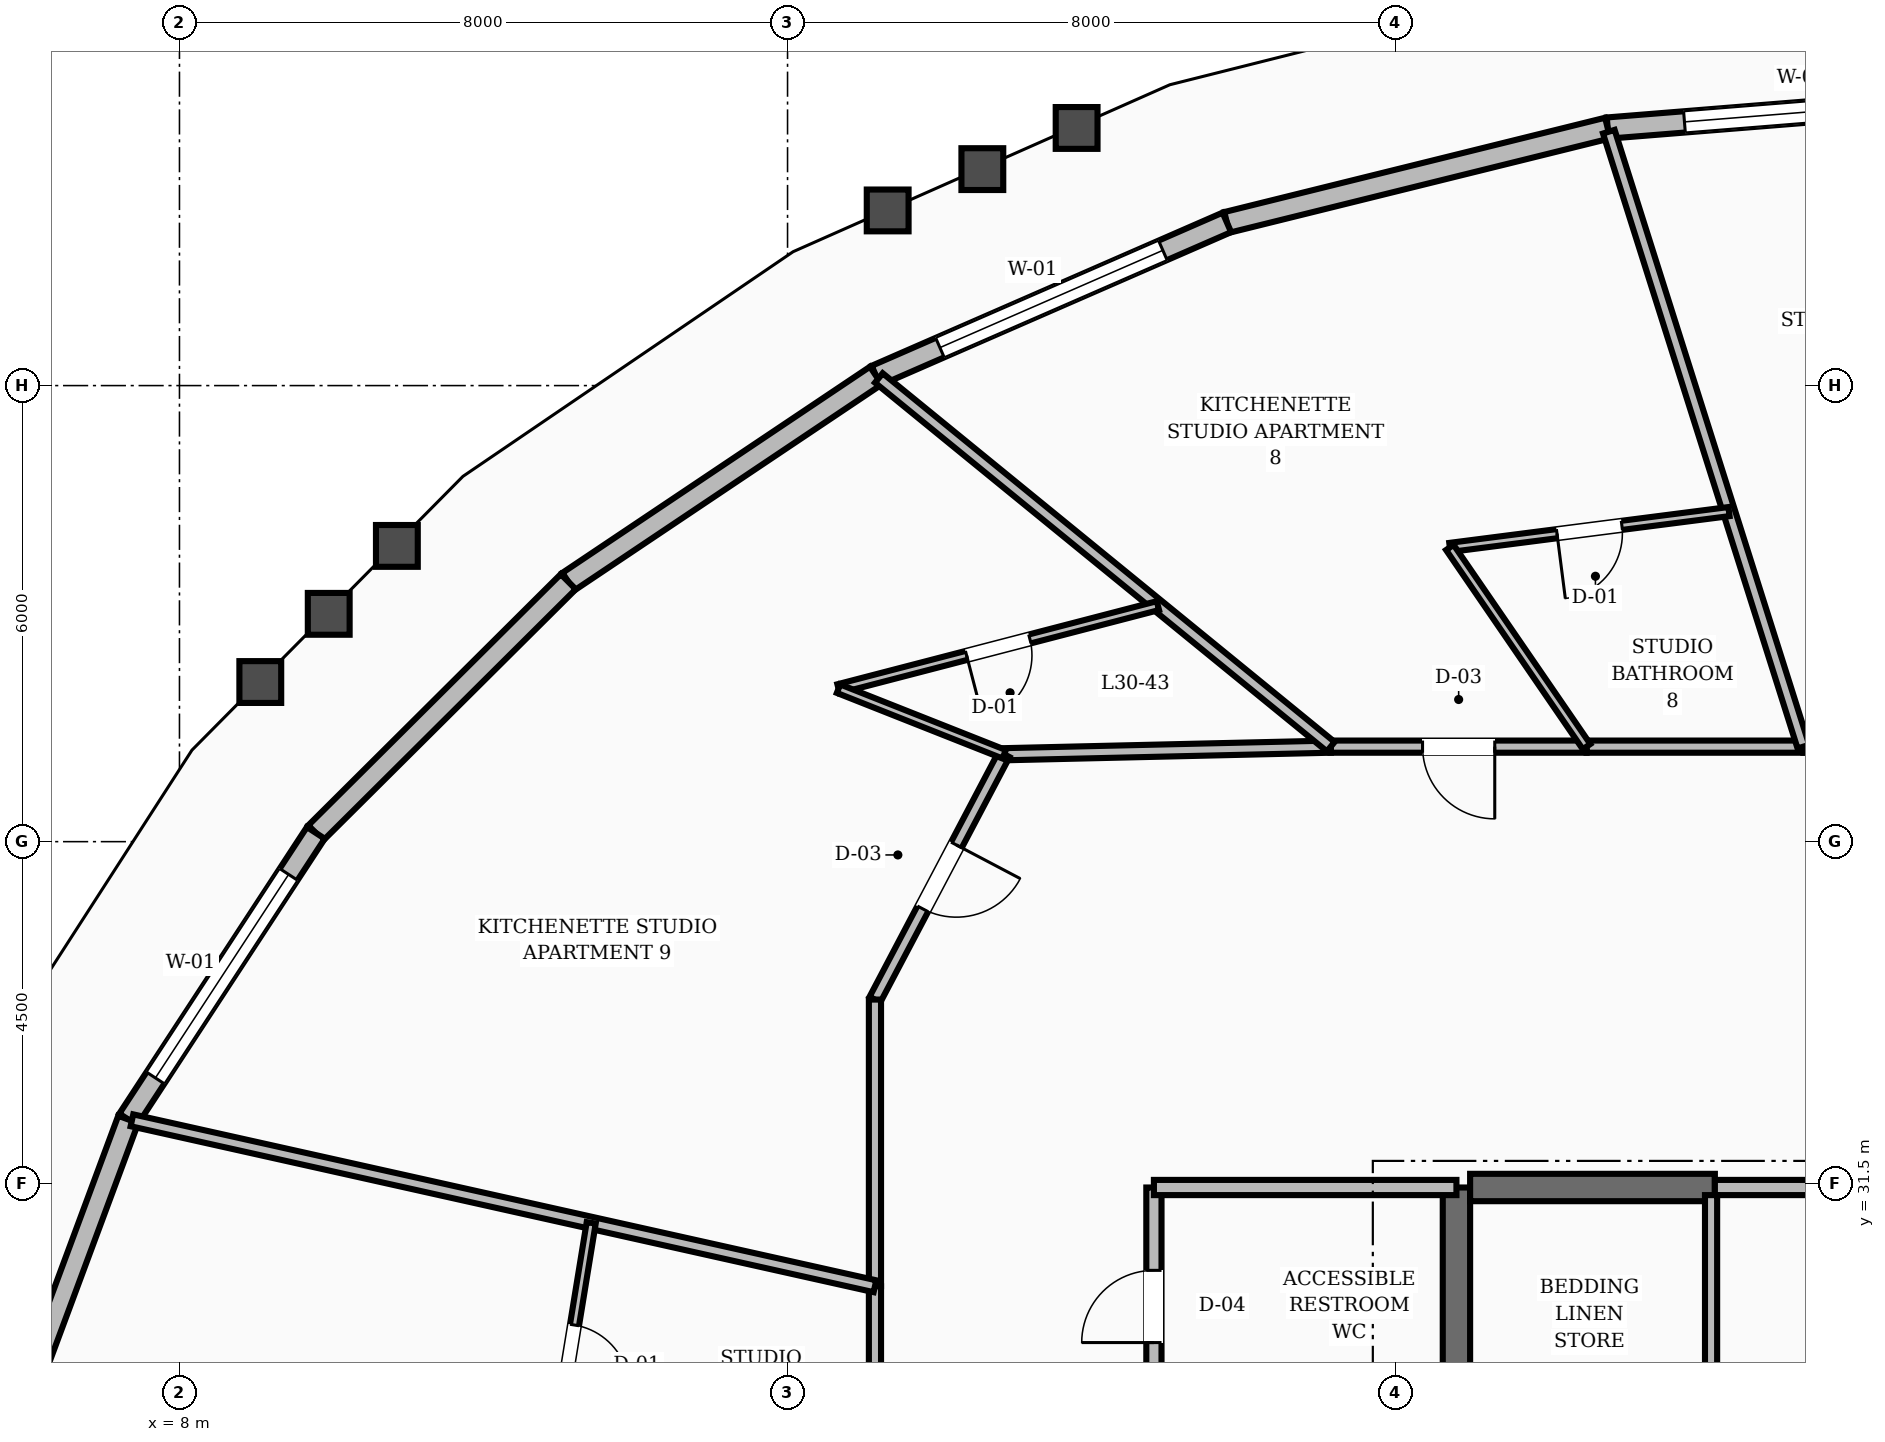
"""IFC4 building model, lengths in metres.
Left out: names, types, materials, properties, quantities, classifications, styles, units other than length and angle.
Written with IfcOpenShell. Run it as: python <this file> out.ifc"""

import sys

from ifc_helpers import new_model, si_unit, direction, frame, frame_2d, origin, place, context, subcontext, project, spatial, rectangle, extrude, element, fill, save


model = new_model("IFC4")
c1 = context("Model", 3, precision=1e-05, world=origin(), true_north=direction((0.0, 1.0)))
c2 = subcontext(c1, "Body", "Model", "MODEL_VIEW")
j1 = project(units=[si_unit("LENGTHUNIT", "METRE"), si_unit("PLANEANGLEUNIT", "RADIAN")], contexts=[c1])
p1 = place(None, origin())
s1 = spatial("IfcSite", under=j1, at=p1, CompositionType="ELEMENT")
p2 = place(p1, origin())
s2 = spatial("IfcBuilding", under=s1, at=p2, CompositionType="ELEMENT")
p3 = place(p2, frame((0.0, 0.0, 120.8)))
s3 = spatial("IfcBuildingStorey", under=s2, at=p3, CompositionType="ELEMENT", Elevation=120.8)
p4 = place(p3, frame((24.8, 25.15, 0.0), z_axis=(0.0, 0.0, 1.0), x_axis=(0.0, 1.0, 0.0)))
e1 = element("IfcWall", 1, at=p4, inside=s3, PredefinedType="SHEAR", context=c2, shape_type="SweptSolid", body=[
    extrude(rectangle(XDim=6.3, YDim=0.36, at=frame_2d((3.15, 0.0))), origin(), (0.0, 0.0, 1.0), 3.6),
])
p5 = place(p3, frame((24.98, 31.45, 0.0), z_axis=(0.0, 0.0, 1.0), x_axis=(1.0, 0.0, 0.0)))
e2 = element("IfcWall", 2, at=p5, inside=s3, PredefinedType="SHEAR", context=c2, shape_type="SweptSolid", body=[
    extrude(rectangle(XDim=3.22, YDim=0.36, at=frame_2d((1.61, 0.0))), origin(), (0.0, 0.0, 1.0), 3.6),
])
p6 = place(p3, frame((32.0, 45.807, 0.0), z_axis=(0.0, 0.0, 1.0), x_axis=(-0.996782820501, -0.080149914249, 0.0)))
e3 = element("IfcWall", 3, at=p6, inside=s3, PredefinedType="STANDARD", context=c2, shape_type="SweptSolid", body=[
    extrude(rectangle(XDim=5.227, YDim=0.28, at=frame_2d((2.614, 0.0))), origin(), (0.0, 0.0, 1.0), 2.82),
])
p7 = place(p6, frame((1.014, 0.0, 0.8)))
e4 = element("IfcOpeningElement", 4, at=p7, cuts=e3, PredefinedType="OPENING", context=c2, shape_type="SweptSolid", body=[
    extrude(rectangle(XDim=3.2, YDim=1.65, at=frame_2d((1.6, 0.825))), frame((0.0, 0.15, 0.0), z_axis=(0.0, -1.0, 0.0), x_axis=(1.0, 0.0, 0.0)), (0.0, 0.0, 1.0), 0.3),
])
p8 = place(p3, frame((26.79, 45.388, 0.0), z_axis=(0.0, 0.0, 1.0), x_axis=(-0.970666096737, -0.240431546694, 0.0)))
e5 = element("IfcWall", 5, at=p8, inside=s3, PredefinedType="STANDARD", context=c2, shape_type="SweptSolid", body=[
    extrude(rectangle(XDim=5.161, YDim=0.28, at=frame_2d((2.581, 0.0))), origin(), (0.0, 0.0, 1.0), 2.82),
])
p9 = place(p3, frame((21.78, 44.147, 0.0), z_axis=(0.0, 0.0, 1.0), x_axis=(-0.916520644769, -0.399987384441, 0.0)))
e6 = element("IfcWall", 6, at=p9, inside=s3, PredefinedType="STANDARD", context=c2, shape_type="SweptSolid", body=[
    extrude(rectangle(XDim=5.038, YDim=0.28, at=frame_2d((2.519, 0.0))), origin(), (0.0, 0.0, 1.0), 2.82),
])
p10 = place(p9, frame((0.919, 0.0, 0.8)))
e7 = element("IfcOpeningElement", 7, at=p10, cuts=e6, PredefinedType="OPENING", context=c2, shape_type="SweptSolid", body=[
    extrude(rectangle(XDim=3.2, YDim=1.65, at=frame_2d((1.6, 0.825))), frame((0.0, 0.15, 0.0), z_axis=(0.0, -1.0, 0.0), x_axis=(1.0, 0.0, 0.0)), (0.0, 0.0, 1.0), 0.3),
])
p11 = place(p3, frame((17.162, 42.132, 0.0), z_axis=(0.0, 0.0, 1.0), x_axis=(-0.830737301714, -0.556664652678, 0.0)))
e8 = element("IfcWall", 8, at=p11, inside=s3, PredefinedType="STANDARD", context=c2, shape_type="SweptSolid", body=[
    extrude(rectangle(XDim=4.872, YDim=0.28, at=frame_2d((2.436, 0.0))), origin(), (0.0, 0.0, 1.0), 2.82),
])
p12 = place(p3, frame((13.115, 39.42, 0.0), z_axis=(0.0, 0.0, 1.0), x_axis=(-0.708876231206, -0.705332892208, 0.0)))
e9 = element("IfcWall", 9, at=p12, inside=s3, PredefinedType="STANDARD", context=c2, shape_type="SweptSolid", body=[
    extrude(rectangle(XDim=4.685, YDim=0.28, at=frame_2d((2.343, 0.0))), origin(), (0.0, 0.0, 1.0), 2.82),
])
p13 = place(p3, frame((9.794, 36.115, 0.0), z_axis=(0.0, 0.0, 1.0), x_axis=(-0.547716413999, -0.836664048371, 0.0)))
e10 = element("IfcWall", 10, at=p13, inside=s3, PredefinedType="STANDARD", context=c2, shape_type="SweptSolid", body=[
    extrude(rectangle(XDim=4.506, YDim=0.28, at=frame_2d((2.253, 0.0))), origin(), (0.0, 0.0, 1.0), 2.82),
])
p14 = place(p13, frame((0.653, 0.0, 0.8)))
e11 = element("IfcOpeningElement", 11, at=p14, cuts=e10, PredefinedType="OPENING", context=c2, shape_type="SweptSolid", body=[
    extrude(rectangle(XDim=3.2, YDim=1.65, at=frame_2d((1.6, 0.825))), frame((0.0, 0.15, 0.0), z_axis=(0.0, -1.0, 0.0), x_axis=(1.0, 0.0, 0.0)), (0.0, 0.0, 1.0), 0.3),
])
p15 = place(p3, frame((7.326, 32.345, 0.0), z_axis=(0.0, 0.0, 1.0), x_axis=(-0.348252546088, -0.937400748956, 0.0)))
e12 = element("IfcWall", 12, at=p15, inside=s3, PredefinedType="STANDARD", context=c2, shape_type="SweptSolid", body=[
    extrude(rectangle(XDim=4.364, YDim=0.28, at=frame_2d((2.182, 0.0))), origin(), (0.0, 0.0, 1.0), 2.82),
])
p16 = place(p3, frame((20.82, 28.32, 0.0), z_axis=(0.0, 0.0, 1.0), x_axis=(0.0, 1.0, 0.0)))
e13 = element("IfcWall", 13, at=p16, inside=s3, PredefinedType="SOLIDWALL", context=c2, shape_type="SweptSolid", body=[
    extrude(rectangle(XDim=3.13, YDim=0.2, at=frame_2d((1.565, 0.0))), origin(), (0.0, 0.0, 1.0), 2.8),
])
p17 = place(p16, frame((1.09, 0.0, 0.0)))
e14 = element("IfcOpeningElement", 14, at=p17, cuts=e13, PredefinedType="OPENING", context=c2, shape_type="SweptSolid", body=[
    extrude(rectangle(XDim=0.95, YDim=2.1, at=frame_2d((0.475, 1.05))), frame((0.0, 0.11, 0.0), z_axis=(0.0, -1.0, 0.0), x_axis=(1.0, 0.0, 0.0)), (0.0, 0.0, 1.0), 0.22),
])
p18 = place(p3, frame((20.82, 31.45, 0.0), z_axis=(0.0, 0.0, 1.0), x_axis=(1.0, 0.0, 0.0)))
e15 = element("IfcWall", 15, at=p18, inside=s3, PredefinedType="SOLIDWALL", context=c2, shape_type="SweptSolid", body=[
    extrude(rectangle(XDim=3.98, YDim=0.2, at=frame_2d((1.99, 0.0))), origin(), (0.0, 0.0, 1.0), 2.8),
])
p19 = place(p3, frame((28.2, 31.45, 0.0), z_axis=(0.0, 0.0, 1.0), x_axis=(1.0, 0.0, 0.0)))
e16 = element("IfcWall", 16, at=p19, inside=s3, PredefinedType="SOLIDWALL", context=c2, shape_type="SweptSolid", body=[
    extrude(rectangle(XDim=7.6, YDim=0.2, at=frame_2d((3.8, 0.0))), origin(), (0.0, 0.0, 1.0), 2.8),
])
p20 = place(p3, frame((28.15, 25.25, 0.0), z_axis=(0.0, 0.0, 1.0), x_axis=(0.0, 1.0, 0.0)))
e17 = element("IfcWall", 17, at=p20, inside=s3, PredefinedType="SOLIDWALL", context=c2, shape_type="SweptSolid", body=[
    extrude(rectangle(XDim=6.1, YDim=0.16, at=frame_2d((3.05, 0.0))), origin(), (0.0, 0.0, 1.0), 2.8),
])
p21 = place(p3, frame((32.0, 37.25, 0.0), z_axis=(0.0, 0.0, 1.0), x_axis=(-1.0, 0.0, 0.0)))
e18 = element("IfcWall", 18, at=p21, inside=s3, PredefinedType="SOLIDWALL", context=c2, shape_type="SweptSolid", body=[
    extrude(rectangle(XDim=2.635, YDim=0.16, at=frame_2d((1.318, 0.0))), origin(), (0.0, 0.0, 1.0), 2.8),
])
p22 = place(p21, frame((0.843, 0.0, 0.0)))
e19 = element("IfcOpeningElement", 19, at=p22, cuts=e18, PredefinedType="OPENING", context=c2, shape_type="SweptSolid", body=[
    extrude(rectangle(XDim=0.95, YDim=2.1, at=frame_2d((0.475, 1.05))), frame((0.0, 0.09, 0.0), z_axis=(0.0, -1.0, 0.0), x_axis=(1.0, 0.0, 0.0)), (0.0, 0.0, 1.0), 0.18),
])
p23 = place(p3, frame((29.365, 37.25, 0.0), z_axis=(0.0, 0.0, 1.0), x_axis=(-1.0, 0.0, 0.0)))
e20 = element("IfcWall", 20, at=p23, inside=s3, PredefinedType="SOLIDWALL", context=c2, shape_type="SweptSolid", body=[
    extrude(rectangle(XDim=2.853, YDim=0.16, at=frame_2d((1.426, 0.0))), origin(), (0.0, 0.0, 1.0), 2.8),
])
p24 = place(p3, frame((26.512, 37.25, 0.0), z_axis=(0.0, 0.0, 1.0), x_axis=(-1.0, 0.0, 0.0)))
e21 = element("IfcWall", 21, at=p24, inside=s3, PredefinedType="SOLIDWALL", context=c2, shape_type="SweptSolid", body=[
    extrude(rectangle(XDim=3.365, YDim=0.16, at=frame_2d((1.683, 0.0))), origin(), (0.0, 0.0, 1.0), 2.8),
])
p25 = place(p24, frame((1.208, 0.0, 0.0)))
e22 = element("IfcOpeningElement", 22, at=p25, cuts=e21, PredefinedType="OPENING", context=c2, shape_type="SweptSolid", body=[
    extrude(rectangle(XDim=0.95, YDim=2.1, at=frame_2d((0.475, 1.05))), frame((0.0, 0.09, 0.0), z_axis=(0.0, -1.0, 0.0), x_axis=(1.0, 0.0, 0.0)), (0.0, 0.0, 1.0), 0.18),
])
p26 = place(p3, frame((23.146, 37.25, 0.0), z_axis=(0.0, 0.0, 1.0), x_axis=(-0.999728709658, -0.023291781507, 0.0)))
e23 = element("IfcWall", 23, at=p26, inside=s3, PredefinedType="SOLIDWALL", context=c2, shape_type="SweptSolid", body=[
    extrude(rectangle(XDim=4.298, YDim=0.16, at=frame_2d((2.149, 0.0))), origin(), (0.0, 0.0, 1.0), 2.8),
])
p27 = place(p3, frame((18.85, 37.15, 0.0), z_axis=(0.0, 0.0, 1.0), x_axis=(-0.466093963429, -0.884735224378, 0.0)))
e24 = element("IfcWall", 24, at=p27, inside=s3, PredefinedType="SOLIDWALL", context=c2, shape_type="SweptSolid", body=[
    extrude(rectangle(XDim=3.648, YDim=0.16, at=frame_2d((1.824, 0.0))), origin(), (0.0, 0.0, 1.0), 2.8),
])
p28 = place(p27, frame((1.349, 0.0, 0.0)))
e25 = element("IfcOpeningElement", 25, at=p28, cuts=e24, PredefinedType="OPENING", context=c2, shape_type="SweptSolid", body=[
    extrude(rectangle(XDim=0.95, YDim=2.1, at=frame_2d((0.475, 1.05))), frame((0.0, 0.09, 0.0), z_axis=(0.0, -1.0, 0.0), x_axis=(1.0, 0.0, 0.0)), (0.0, 0.0, 1.0), 0.18),
])
p29 = place(p3, frame((17.15, 33.923, 0.0), z_axis=(0.0, 0.0, 1.0), x_axis=(0.0, -1.0, 0.0)))
e26 = element("IfcWall", 26, at=p29, inside=s3, PredefinedType="SOLIDWALL", context=c2, shape_type="SweptSolid", body=[
    extrude(rectangle(XDim=3.771, YDim=0.16, at=frame_2d((1.886, 0.0))), origin(), (0.0, 0.0, 1.0), 2.8),
])
p30 = place(p3, frame((17.15, 30.151, 0.0), z_axis=(0.0, 0.0, 1.0), x_axis=(0.0, -1.0, 0.0)))
e27 = element("IfcWall", 27, at=p30, inside=s3, PredefinedType="SOLIDWALL", context=c2, shape_type="SweptSolid", body=[
    extrude(rectangle(XDim=3.197, YDim=0.16, at=frame_2d((1.599, 0.0))), origin(), (0.0, 0.0, 1.0), 2.8),
])
p31 = place(p3, frame((29.365, 37.25, 0.0), z_axis=(0.0, 0.0, 1.0), x_axis=(-0.30167247597, 0.953411620048, 0.0)))
e28 = element("IfcWall", 28, at=p31, inside=s3, PredefinedType="SOLIDWALL", context=c2, shape_type="SweptSolid", body=[
    extrude(rectangle(XDim=8.485, YDim=0.16, at=frame_2d((4.243, 0.0))), origin(), (0.0, 0.0, 1.0), 2.8),
])
p32 = place(p3, frame((28.386, 40.342, 0.0), z_axis=(0.0, 0.0, 1.0), x_axis=(-0.991861607412, -0.127320665021, 0.0)))
e29 = element("IfcWall", 29, at=p32, inside=s3, PredefinedType="PARTITIONING", context=c2, shape_type="SweptSolid", body=[
    extrude(rectangle(XDim=3.703, YDim=0.12, at=frame_2d((1.851, 0.0))), origin(), (0.0, 0.0, 1.0), 2.8),
])
p33 = place(p32, frame((1.421, 0.0, 0.0)))
e30 = element("IfcOpeningElement", 30, at=p33, cuts=e29, PredefinedType="OPENING", context=c2, shape_type="SweptSolid", body=[
    extrude(rectangle(XDim=0.86, YDim=2.1, at=frame_2d((0.43, 1.05))), frame((0.0, 0.07, 0.0), z_axis=(0.0, -1.0, 0.0), x_axis=(1.0, 0.0, 0.0)), (0.0, 0.0, 1.0), 0.14),
])
p34 = place(p3, frame((26.512, 37.25, 0.0), z_axis=(0.0, 0.0, 1.0), x_axis=(-0.56578208736, 0.824554806925, 0.0)))
e31 = element("IfcWall", 31, at=p34, inside=s3, PredefinedType="PARTITIONING", context=c2, shape_type="SweptSolid", body=[
    extrude(rectangle(XDim=3.178, YDim=0.12, at=frame_2d((1.589, 0.0))), origin(), (0.0, 0.0, 1.0), 2.8),
])
p35 = place(p3, frame((23.146, 37.25, 0.0), z_axis=(0.0, 0.0, 1.0), x_axis=(-0.774866661355, 0.632124716429, 0.0)))
e32 = element("IfcWall", 32, at=p35, inside=s3, PredefinedType="SOLIDWALL", context=c2, shape_type="SweptSolid", body=[
    extrude(rectangle(XDim=7.673, YDim=0.16, at=frame_2d((3.836, 0.0))), origin(), (0.0, 0.0, 1.0), 2.8),
])
p36 = place(p3, frame((20.873, 39.105, 0.0), z_axis=(0.0, 0.0, 1.0), x_axis=(-0.967817028368, -0.25165492167, 0.0)))
e33 = element("IfcWall", 33, at=p36, inside=s3, PredefinedType="PARTITIONING", context=c2, shape_type="SweptSolid", body=[
    extrude(rectangle(XDim=4.341, YDim=0.12, at=frame_2d((2.171, 0.0))), origin(), (0.0, 0.0, 1.0), 2.8),
])
p37 = place(p36, frame((1.741, 0.0, 0.0)))
e34 = element("IfcOpeningElement", 34, at=p37, cuts=e33, PredefinedType="OPENING", context=c2, shape_type="SweptSolid", body=[
    extrude(rectangle(XDim=0.86, YDim=2.1, at=frame_2d((0.43, 1.05))), frame((0.0, 0.07, 0.0), z_axis=(0.0, -1.0, 0.0), x_axis=(1.0, 0.0, 0.0)), (0.0, 0.0, 1.0), 0.14),
])
p38 = place(p3, frame((18.85, 37.15, 0.0), z_axis=(0.0, 0.0, 1.0), x_axis=(-0.929814039577, 0.368029688755, 0.0)))
e35 = element("IfcWall", 35, at=p38, inside=s3, PredefinedType="PARTITIONING", context=c2, shape_type="SweptSolid", body=[
    extrude(rectangle(XDim=2.344, YDim=0.12, at=frame_2d((1.172, 0.0))), origin(), (0.0, 0.0, 1.0), 2.8),
])
p39 = place(p3, frame((17.15, 30.151, 0.0), z_axis=(0.0, 0.0, 1.0), x_axis=(-0.975957101014, 0.217962696303, 0.0)))
e36 = element("IfcWall", 36, at=p39, inside=s3, PredefinedType="SOLIDWALL", context=c2, shape_type="SweptSolid", body=[
    extrude(rectangle(XDim=10.016, YDim=0.16, at=frame_2d((5.008, 0.0))), origin(), (0.0, 0.0, 1.0), 2.8),
])
p40 = place(p3, frame((13.417, 30.985, 0.0), z_axis=(0.0, 0.0, 1.0), x_axis=(-0.161117002458, -0.986935312733, 0.0)))
e37 = element("IfcWall", 37, at=p40, inside=s3, PredefinedType="PARTITIONING", context=c2, shape_type="SweptSolid", body=[
    extrude(rectangle(XDim=3.584, YDim=0.12, at=frame_2d((1.792, 0.0))), origin(), (0.0, 0.0, 1.0), 2.8),
])
p41 = place(p40, frame((1.362, 0.0, 0.0)))
e38 = element("IfcOpeningElement", 38, at=p41, cuts=e37, PredefinedType="OPENING", context=c2, shape_type="SweptSolid", body=[
    extrude(rectangle(XDim=0.86, YDim=2.1, at=frame_2d((0.43, 1.05))), frame((0.0, 0.07, 0.0), z_axis=(0.0, -1.0, 0.0), x_axis=(1.0, 0.0, 0.0)), (0.0, 0.0, 1.0), 0.14),
])
p42 = place(p7, origin())
e39 = element("IfcWindow", 39, at=p42, inside=s3, PartitioningType="SINGLE_PANEL", PredefinedType="WINDOW", context=c2, shape_type="SweptSolid", body=[
    extrude(rectangle(XDim=3.2, YDim=1.65, at=frame_2d((1.6, 0.825))), frame((0.0, 0.03, 0.0), z_axis=(0.0, -1.0, 0.0), x_axis=(1.0, 0.0, 0.0)), (0.0, 0.0, 1.0), 0.06),
])
fill(e4, e39)
p43 = place(p10, origin())
e40 = element("IfcWindow", 40, at=p43, inside=s3, PartitioningType="SINGLE_PANEL", PredefinedType="WINDOW", context=c2, shape_type="SweptSolid", body=[
    extrude(rectangle(XDim=3.2, YDim=1.65, at=frame_2d((1.6, 0.825))), frame((0.0, 0.03, 0.0), z_axis=(0.0, -1.0, 0.0), x_axis=(1.0, 0.0, 0.0)), (0.0, 0.0, 1.0), 0.06),
])
fill(e7, e40)
p44 = place(p14, origin())
e41 = element("IfcWindow", 41, at=p44, inside=s3, PartitioningType="SINGLE_PANEL", PredefinedType="WINDOW", context=c2, shape_type="SweptSolid", body=[
    extrude(rectangle(XDim=3.2, YDim=1.65, at=frame_2d((1.6, 0.825))), frame((0.0, 0.03, 0.0), z_axis=(0.0, -1.0, 0.0), x_axis=(1.0, 0.0, 0.0)), (0.0, 0.0, 1.0), 0.06),
])
fill(e11, e41)
p45 = place(p17, origin())
e42 = element("IfcDoor", 42, at=p45, inside=s3, OperationType="SINGLE_SWING_LEFT", PredefinedType="DOOR", context=c2, shape_type="SweptSolid", body=[
    extrude(rectangle(XDim=0.95, YDim=2.1, at=frame_2d((0.475, 1.05))), frame((0.0, 0.025, 0.0), z_axis=(0.0, -1.0, 0.0), x_axis=(1.0, 0.0, 0.0)), (0.0, 0.0, 1.0), 0.05),
])
fill(e14, e42)
p46 = place(p33, origin())
e43 = element("IfcDoor", 43, at=p46, inside=s3, OperationType="SINGLE_SWING_RIGHT", PredefinedType="DOOR", context=c2, shape_type="SweptSolid", body=[
    extrude(rectangle(XDim=0.86, YDim=2.1, at=frame_2d((0.43, 1.05))), frame((0.0, 0.025, 0.0), z_axis=(0.0, -1.0, 0.0), x_axis=(1.0, 0.0, 0.0)), (0.0, 0.0, 1.0), 0.05),
])
fill(e30, e43)
p47 = place(p25, origin())
e44 = element("IfcDoor", 44, at=p47, inside=s3, OperationType="SINGLE_SWING_LEFT", PredefinedType="DOOR", context=c2, shape_type="SweptSolid", body=[
    extrude(rectangle(XDim=0.95, YDim=2.1, at=frame_2d((0.475, 1.05))), frame((0.0, 0.025, 0.0), z_axis=(0.0, -1.0, 0.0), x_axis=(1.0, 0.0, 0.0)), (0.0, 0.0, 1.0), 0.05),
])
fill(e22, e44)
p48 = place(p37, origin())
e45 = element("IfcDoor", 45, at=p48, inside=s3, OperationType="SINGLE_SWING_RIGHT", PredefinedType="DOOR", context=c2, shape_type="SweptSolid", body=[
    extrude(rectangle(XDim=0.86, YDim=2.1, at=frame_2d((0.43, 1.05))), frame((0.0, 0.025, 0.0), z_axis=(0.0, -1.0, 0.0), x_axis=(1.0, 0.0, 0.0)), (0.0, 0.0, 1.0), 0.05),
])
fill(e34, e45)
p49 = place(p28, origin())
e46 = element("IfcDoor", 46, at=p49, inside=s3, OperationType="SINGLE_SWING_LEFT", PredefinedType="DOOR", context=c2, shape_type="SweptSolid", body=[
    extrude(rectangle(XDim=0.95, YDim=2.1, at=frame_2d((0.475, 1.05))), frame((0.0, 0.025, 0.0), z_axis=(0.0, -1.0, 0.0), x_axis=(1.0, 0.0, 0.0)), (0.0, 0.0, 1.0), 0.05),
])
fill(e25, e46)
p50 = place(p41, origin())
e47 = element("IfcDoor", 47, at=p50, inside=s3, OperationType="SINGLE_SWING_RIGHT", PredefinedType="DOOR", context=c2, shape_type="SweptSolid", body=[
    extrude(rectangle(XDim=0.86, YDim=2.1, at=frame_2d((0.43, 1.05))), frame((0.0, 0.025, 0.0), z_axis=(0.0, -1.0, 0.0), x_axis=(1.0, 0.0, 0.0)), (0.0, 0.0, 1.0), 0.05),
])
fill(e38, e47)
save(model, sys.argv[1])
